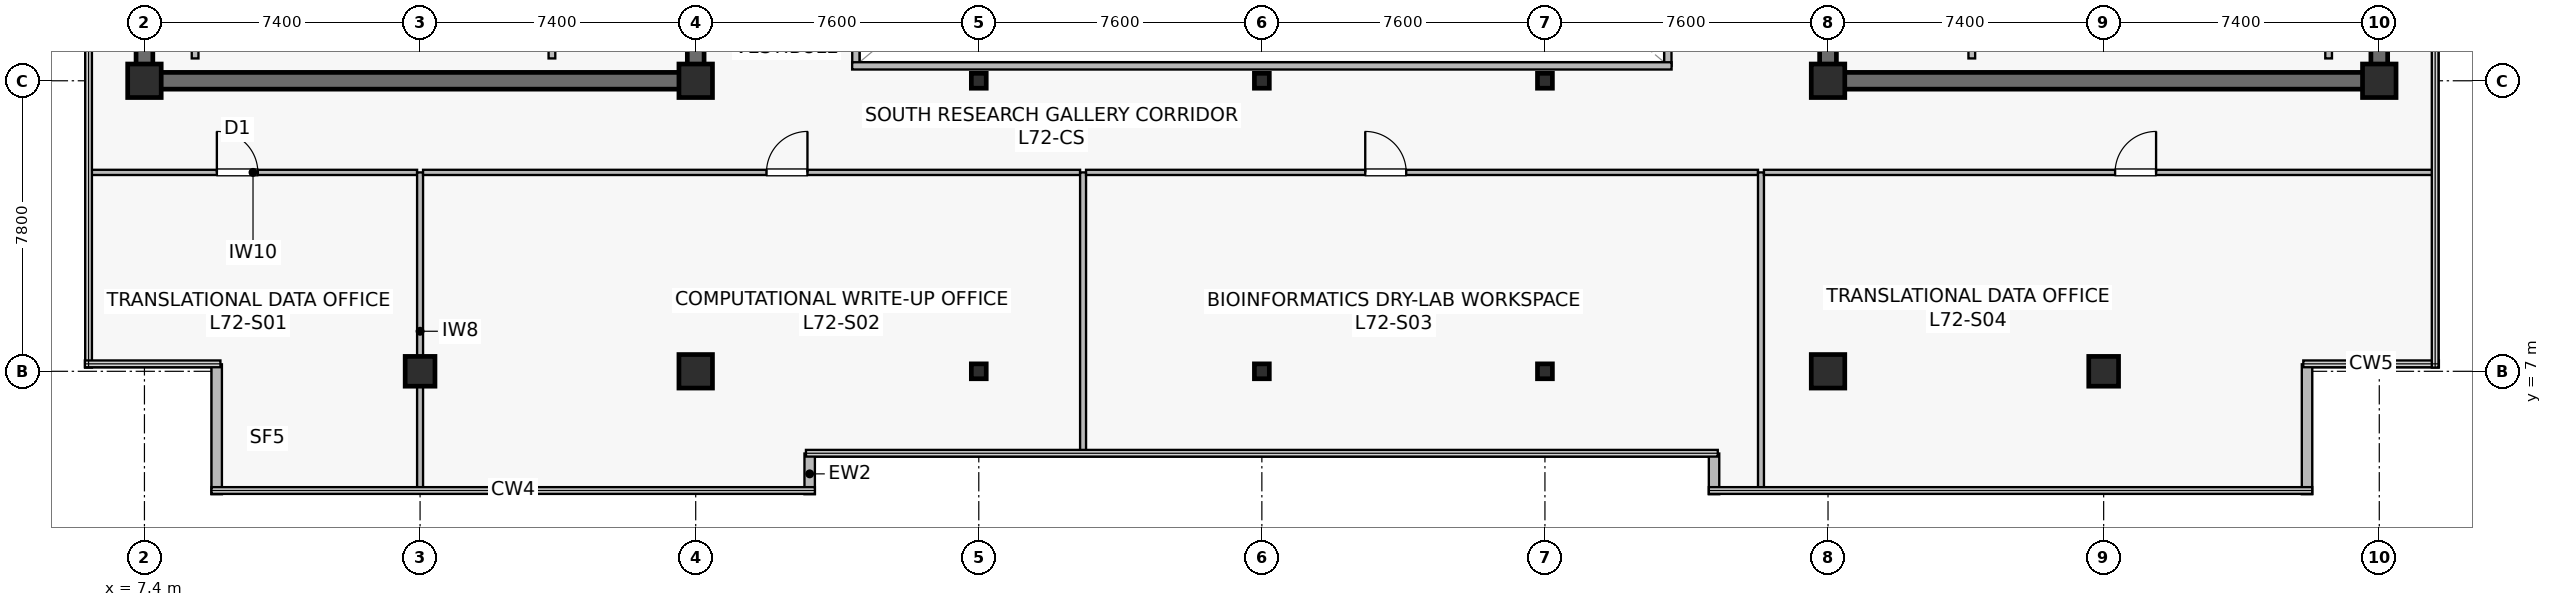
"""IFC4 building model, lengths in metres.
Left out: names, types, materials, properties, quantities, classifications, styles, units other than length and angle.
Written with IfcOpenShell. Run it as: python <this file> out.ifc"""

import sys

from ifc_helpers import new_model, si_unit, direction, frame, frame_2d, origin, origin_2d, place, context, subcontext, project, spatial, rectangle, i_section, extrude, source, transform, mapped, element, fill, save


model = new_model("IFC4")
c1 = context("Model", 3, precision=1e-05, world=origin(), true_north=direction((0.0, 1.0)))
c2 = subcontext(c1, "Body", "Model", "MODEL_VIEW")
j1 = project(units=[si_unit("LENGTHUNIT", "METRE"), si_unit("PLANEANGLEUNIT", "RADIAN")], contexts=[c1])
p1 = place(None, origin())
s1 = spatial("IfcSite", under=j1, at=p1, CompositionType="ELEMENT")
p2 = place(p1, origin())
s2 = spatial("IfcBuilding", under=s1, at=p2, CompositionType="ELEMENT")
p3 = place(p2, frame((0.0, 0.0, 301.8)))
s3 = spatial("IfcBuildingStorey", under=s2, at=p3, CompositionType="ELEMENT", Elevation=301.8)
p4 = place(p3, frame((7.175, 14.8, 0.0), z_axis=(0.0, 0.0, 1.0), x_axis=(1.0, 0.0, 0.0)))
e1 = element("IfcWall", 1, at=p4, inside=s3, PredefinedType="SHEAR", context=c2, shape_type="SweptSolid", body=[
    extrude(rectangle(XDim=15.25, YDim=0.45, at=frame_2d((7.625, 0.0))), origin(), (0.0, 0.0, 1.0), 3.9),
])
p5 = place(p3, frame((7.4, 15.025, 0.0), z_axis=(0.0, 0.0, 1.0), x_axis=(0.0, 1.0, 0.0)))
e2 = element("IfcWall", 2, at=p5, inside=s3, PredefinedType="SHEAR", context=c2, shape_type="SweptSolid", body=[
    extrude(rectangle(XDim=18.55, YDim=0.45, at=frame_2d((9.275, 0.0))), origin(), (0.0, 0.0, 1.0), 3.9),
])
p6 = place(p3, frame((22.2, 15.025, 0.0), z_axis=(0.0, 0.0, 1.0), x_axis=(0.0, 1.0, 0.0)))
e3 = element("IfcWall", 3, at=p6, inside=s3, PredefinedType="SHEAR", context=c2, shape_type="SweptSolid", body=[
    extrude(rectangle(XDim=18.55, YDim=0.45, at=frame_2d((9.275, 0.0))), origin(), (0.0, 0.0, 1.0), 3.9),
])
p7 = place(p6, frame((3.525, 0.0, 0.0)))
e4 = element("IfcOpeningElement", 4, at=p7, cuts=e3, PredefinedType="OPENING", context=c2, shape_type="SweptSolid", body=[
    extrude(rectangle(XDim=1.42, YDim=2.2, at=frame_2d((0.71, 1.1))), frame((0.0, 0.235, 0.0), z_axis=(0.0, -1.0, 0.0), x_axis=(1.0, 0.0, 0.0)), (0.0, 0.0, 1.0), 0.47),
])
p8 = place(p3, frame((52.375, 14.8, 0.0), z_axis=(0.0, 0.0, 1.0), x_axis=(1.0, 0.0, 0.0)))
e5 = element("IfcWall", 5, at=p8, inside=s3, PredefinedType="SHEAR", context=c2, shape_type="SweptSolid", body=[
    extrude(rectangle(XDim=15.25, YDim=0.45, at=frame_2d((7.625, 0.0))), origin(), (0.0, 0.0, 1.0), 3.9),
])
p9 = place(p3, frame((52.6, 15.025, 0.0), z_axis=(0.0, 0.0, 1.0), x_axis=(0.0, 1.0, 0.0)))
e6 = element("IfcWall", 6, at=p9, inside=s3, PredefinedType="SHEAR", context=c2, shape_type="SweptSolid", body=[
    extrude(rectangle(XDim=18.55, YDim=0.45, at=frame_2d((9.275, 0.0))), origin(), (0.0, 0.0, 1.0), 3.9),
])
p10 = place(p9, frame((3.525, 0.0, 0.0)))
e7 = element("IfcOpeningElement", 7, at=p10, cuts=e6, PredefinedType="OPENING", context=c2, shape_type="SweptSolid", body=[
    extrude(rectangle(XDim=1.42, YDim=2.2, at=frame_2d((0.71, 1.1))), frame((0.0, 0.235, 0.0), z_axis=(0.0, -1.0, 0.0), x_axis=(1.0, 0.0, 0.0)), (0.0, 0.0, 1.0), 0.47),
])
p11 = place(p3, frame((67.4, 15.025, 0.0), z_axis=(0.0, 0.0, 1.0), x_axis=(0.0, 1.0, 0.0)))
e8 = element("IfcWall", 8, at=p11, inside=s3, PredefinedType="SHEAR", context=c2, shape_type="SweptSolid", body=[
    extrude(rectangle(XDim=18.55, YDim=0.45, at=frame_2d((9.275, 0.0))), origin(), (0.0, 0.0, 1.0), 3.9),
])
m1 = source(origin(), c2, "Body", "SweptSolid", [
    extrude(rectangle(XDim=0.8, YDim=0.8, at=origin_2d()), origin(), (0.0, 0.0, 1.0), 4.2),
])
p12 = place(p3, frame((14.8, 7.0, 0.0), z_axis=(0.0, 0.0, 1.0), x_axis=(1.0, 0.0, 0.0)))
e9 = element("IfcColumn", 9, at=p12, inside=s3, PredefinedType="COLUMN", context=c2, shape_type="MappedRepresentation", body=[
    mapped(m1, transform((0.0, 0.0, 0.0), scale=1.0)),
])
m2 = source(origin(), c2, "Body", "SweptSolid", [
    extrude(rectangle(XDim=0.9, YDim=0.9, at=origin_2d()), origin(), (0.0, 0.0, 1.0), 4.2),
])
for number, where, z_axis, x_axis in (
    (10, (22.2, 7.0, 0.0), (0.0, 0.0, 1.0), (1.0, 0.0, 0.0)),
    (11, (7.4, 14.8, 0.0), (0.0, 0.0, 1.0), (1.0, 0.0, 0.0)),
    (12, (22.2, 14.8, 0.0), (0.0, 0.0, 1.0), (1.0, 0.0, 0.0)),
    (13, (52.6, 7.0, 0.0), (0.0, 0.0, 1.0), (1.0, 0.0, 0.0)),
):
    element("IfcColumn", number, at=place(p3, frame(where, z_axis=z_axis, x_axis=x_axis)), inside=s3, PredefinedType="COLUMN", context=c2, shape_type="MappedRepresentation", body=[
        mapped(m2, transform((0.0, 0.0, 0.0), scale=1.0)),
    ])
p13 = place(p3, frame((60.0, 7.0, 0.0), z_axis=(0.0, 0.0, 1.0), x_axis=(1.0, 0.0, 0.0)))
e14 = element("IfcColumn", 14, at=p13, inside=s3, PredefinedType="COLUMN", context=c2, shape_type="MappedRepresentation", body=[
    mapped(m1, transform((0.0, 0.0, 0.0), scale=1.0)),
])
for number, where, z_axis, x_axis in (
    (15, (52.6, 14.8, 0.0), (0.0, 0.0, 1.0), (1.0, 0.0, 0.0)),
    (16, (67.4, 14.8, 0.0), (0.0, 0.0, 1.0), (1.0, 0.0, 0.0)),
):
    element("IfcColumn", number, at=place(p3, frame(where, z_axis=z_axis, x_axis=x_axis)), inside=s3, PredefinedType="COLUMN", context=c2, shape_type="MappedRepresentation", body=[
        mapped(m2, transform((0.0, 0.0, 0.0), scale=1.0)),
    ])
m3 = source(origin(), c2, "Body", "SweptSolid", [
    extrude(i_section(OverallWidth=0.4, OverallDepth=0.4, WebThickness=0.021, FlangeThickness=0.021, at=origin_2d()), origin(), (0.0, 0.0, 1.0), 4.2),
])
for number, where, z_axis, x_axis in (
    (17, (29.8, 7.0, 0.0), (0.0, 0.0, 1.0), (1.0, 0.0, 0.0)),
    (18, (29.8, 14.8, 0.0), (0.0, 0.0, 1.0), (1.0, 0.0, 0.0)),
    (19, (37.4, 7.0, 0.0), (0.0, 0.0, 1.0), (1.0, 0.0, 0.0)),
    (20, (37.4, 14.8, 0.0), (0.0, 0.0, 1.0), (1.0, 0.0, 0.0)),
    (21, (45.0, 7.0, 0.0), (0.0, 0.0, 1.0), (1.0, 0.0, 0.0)),
    (22, (45.0, 14.8, 0.0), (0.0, 0.0, 1.0), (1.0, 0.0, 0.0)),
):
    element("IfcColumn", number, at=place(p3, frame(where, z_axis=z_axis, x_axis=x_axis)), inside=s3, PredefinedType="COLUMN", context=c2, shape_type="MappedRepresentation", body=[
        mapped(m3, transform((0.0, 0.0, 0.0), scale=1.0)),
    ])
for number, where, z_axis, x_axis in (
    (23, (25.26, 3.7, 0.0), (0.0, 0.0, 1.0), (0.0, 1.0, 0.0)),
    (24, (49.54, 4.793, 0.0), (0.0, 0.0, 1.0), (0.0, -1.0, 0.0)),
):
    element("IfcWall", number, at=place(p3, frame(where, z_axis=z_axis, x_axis=x_axis)), inside=s3, PredefinedType="STANDARD", context=c2, shape_type="SweptSolid", body=[
        extrude(rectangle(XDim=1.093, YDim=0.28, at=frame_2d((0.546, 0.0))), origin(), (0.0, 0.0, 1.0), 3.9),
    ])
for number, where, z_axis, x_axis in (
    (25, (65.46, 3.7, 0.0), (0.0, 0.0, 1.0), (0.0, 1.0, 0.0)),
    (26, (9.34, 7.188, 0.0), (0.0, 0.0, 1.0), (0.0, -1.0, 0.0)),
):
    element("IfcWall", number, at=place(p3, frame(where, z_axis=z_axis, x_axis=x_axis)), inside=s3, PredefinedType="STANDARD", context=c2, shape_type="SweptSolid", body=[
        extrude(rectangle(XDim=3.488, YDim=0.28, at=frame_2d((1.744, 0.0))), origin(), (0.0, 0.0, 1.0), 3.9),
    ])
for number, where, z_axis, x_axis in (
    (27, (18.34, 15.4, 0.0), (0.0, 0.0, 1.0), (0.0, 1.0, 0.0)),
    (28, (8.76, 15.4, 0.0), (0.0, 0.0, 1.0), (0.0, 1.0, 0.0)),
    (29, (56.46, 15.4, 0.0), (0.0, 0.0, 1.0), (0.0, 1.0, 0.0)),
    (30, (66.04, 15.4, 0.0), (0.0, 0.0, 1.0), (0.0, 1.0, 0.0)),
):
    element("IfcWall", number, at=place(p3, frame(where, z_axis=z_axis, x_axis=x_axis)), inside=s3, PredefinedType="SOLIDWALL", context=c2, shape_type="SweptSolid", body=[
        extrude(rectangle(XDim=2.4, YDim=0.18, at=frame_2d((1.2, 0.0))), origin(), (0.0, 0.0, 1.0), 3.9),
    ])
p14 = place(p3, frame((26.5, 15.2, 0.0), z_axis=(0.0, 0.0, 1.0), x_axis=(0.0, 1.0, 0.0)))
e31 = element("IfcWall", 31, at=p14, inside=s3, PredefinedType="SOLIDWALL", context=c2, shape_type="SweptSolid", body=[
    extrude(rectangle(XDim=18.2, YDim=0.195, at=frame_2d((9.1, 0.0))), origin(), (0.0, 0.0, 1.0), 3.9),
])
p15 = place(p14, frame((1.8, 0.0, 0.9)))
e32 = element("IfcOpeningElement", 32, at=p15, cuts=e31, PredefinedType="OPENING", context=c2, shape_type="SweptSolid", body=[
    extrude(rectangle(XDim=1.5, YDim=1.4, at=frame_2d((0.75, 0.7))), frame((0.0, 0.107, 0.0), z_axis=(0.0, -1.0, 0.0), x_axis=(1.0, 0.0, 0.0)), (0.0, 0.0, 1.0), 0.215),
])
p16 = place(p14, frame((13.2, 0.0, 0.9)))
e33 = element("IfcOpeningElement", 33, at=p16, cuts=e31, PredefinedType="OPENING", context=c2, shape_type="SweptSolid", body=[
    extrude(rectangle(XDim=1.5, YDim=1.4, at=frame_2d((0.75, 0.7))), frame((0.0, 0.107, 0.0), z_axis=(0.0, -1.0, 0.0), x_axis=(1.0, 0.0, 0.0)), (0.0, 0.0, 1.0), 0.215),
])
p17 = place(p3, frame((48.3, 15.2, 0.0), z_axis=(0.0, 0.0, 1.0), x_axis=(0.0, 1.0, 0.0)))
e34 = element("IfcWall", 34, at=p17, inside=s3, PredefinedType="SOLIDWALL", context=c2, shape_type="SweptSolid", body=[
    extrude(rectangle(XDim=18.2, YDim=0.195, at=frame_2d((9.1, 0.0))), origin(), (0.0, 0.0, 1.0), 3.9),
])
p18 = place(p17, frame((1.8, 0.0, 0.9)))
e35 = element("IfcOpeningElement", 35, at=p18, cuts=e34, PredefinedType="OPENING", context=c2, shape_type="SweptSolid", body=[
    extrude(rectangle(XDim=1.5, YDim=1.4, at=frame_2d((0.75, 0.7))), frame((0.0, 0.107, 0.0), z_axis=(0.0, -1.0, 0.0), x_axis=(1.0, 0.0, 0.0)), (0.0, 0.0, 1.0), 0.215),
])
p19 = place(p17, frame((13.2, 0.0, 0.9)))
e36 = element("IfcOpeningElement", 36, at=p19, cuts=e34, PredefinedType="OPENING", context=c2, shape_type="SweptSolid", body=[
    extrude(rectangle(XDim=1.5, YDim=1.4, at=frame_2d((0.75, 0.7))), frame((0.0, 0.107, 0.0), z_axis=(0.0, -1.0, 0.0), x_axis=(1.0, 0.0, 0.0)), (0.0, 0.0, 1.0), 0.215),
])
p20 = place(p3, frame((26.4, 15.2, 0.0), z_axis=(0.0, 0.0, 1.0), x_axis=(1.0, 0.0, 0.0)))
e37 = element("IfcWall", 37, at=p20, inside=s3, PredefinedType="SOLIDWALL", context=c2, shape_type="SweptSolid", body=[
    extrude(rectangle(XDim=22.0, YDim=0.195, at=frame_2d((11.0, 0.0))), origin(), (0.0, 0.0, 1.0), 3.9),
])
p21 = place(p3, frame((5.91, 12.34, 0.0), z_axis=(0.0, 0.0, 1.0), x_axis=(1.0, 0.0, 0.0)))
e38 = element("IfcWall", 38, at=p21, inside=s3, PredefinedType="PARTITIONING", context=c2, shape_type="SweptSolid", body=[
    extrude(rectangle(XDim=8.81, YDim=0.14, at=frame_2d((4.405, 0.0))), origin(), (0.0, 0.0, 1.0), 3.297),
])
p22 = place(p21, frame((3.434, 0.0, 0.0)))
e39 = element("IfcOpeningElement", 39, at=p22, cuts=e38, PredefinedType="OPENING", context=c2, shape_type="SweptSolid", body=[
    extrude(rectangle(XDim=1.1, YDim=2.18, at=frame_2d((0.55, 1.09))), frame((0.0, 0.08, 0.0), z_axis=(0.0, -1.0, 0.0), x_axis=(1.0, 0.0, 0.0)), (0.0, 0.0, 1.0), 0.16),
])
p23 = place(p3, frame((14.8, 3.81, 0.0), z_axis=(0.0, 0.0, 1.0), x_axis=(0.0, 1.0, 0.0)))
e40 = element("IfcWall", 40, at=p23, inside=s3, PredefinedType="PARTITIONING", context=c2, shape_type="SweptSolid", body=[
    extrude(rectangle(XDim=8.53, YDim=0.16, at=frame_2d((4.265, 0.0))), origin(), (0.0, 0.0, 1.0), 3.235),
])
p24 = place(p3, frame((14.88, 12.34, 0.0), z_axis=(0.0, 0.0, 1.0), x_axis=(1.0, 0.0, 0.0)))
e41 = element("IfcWall", 41, at=p24, inside=s3, PredefinedType="PARTITIONING", context=c2, shape_type="SweptSolid", body=[
    extrude(rectangle(XDim=17.64, YDim=0.14, at=frame_2d((8.82, 0.0))), origin(), (0.0, 0.0, 1.0), 3.297),
])
p25 = place(p24, frame((9.22, 0.0, 0.0)))
e42 = element("IfcOpeningElement", 42, at=p25, cuts=e41, PredefinedType="OPENING", context=c2, shape_type="SweptSolid", body=[
    extrude(rectangle(XDim=1.1, YDim=2.18, at=frame_2d((0.55, 1.09))), frame((0.0, 0.08, 0.0), z_axis=(0.0, -1.0, 0.0), x_axis=(1.0, 0.0, 0.0)), (0.0, 0.0, 1.0), 0.16),
])
p26 = place(p3, frame((32.6, 4.81, 0.0), z_axis=(0.0, 0.0, 1.0), x_axis=(0.0, 1.0, 0.0)))
e43 = element("IfcWall", 43, at=p26, inside=s3, PredefinedType="PARTITIONING", context=c2, shape_type="SweptSolid", body=[
    extrude(rectangle(XDim=7.53, YDim=0.16, at=frame_2d((3.765, 0.0))), origin(), (0.0, 0.0, 1.0), 2.985),
])
p27 = place(p3, frame((32.68, 12.34, 0.0), z_axis=(0.0, 0.0, 1.0), x_axis=(1.0, 0.0, 0.0)))
e44 = element("IfcWall", 44, at=p27, inside=s3, PredefinedType="PARTITIONING", context=c2, shape_type="SweptSolid", body=[
    extrude(rectangle(XDim=18.04, YDim=0.14, at=frame_2d((9.02, 0.0))), origin(), (0.0, 0.0, 1.0), 3.297),
])
p28 = place(p27, frame((7.496, 0.0, 0.0)))
e45 = element("IfcOpeningElement", 45, at=p28, cuts=e44, PredefinedType="OPENING", context=c2, shape_type="SweptSolid", body=[
    extrude(rectangle(XDim=1.1, YDim=2.18, at=frame_2d((0.55, 1.09))), frame((0.0, 0.08, 0.0), z_axis=(0.0, -1.0, 0.0), x_axis=(1.0, 0.0, 0.0)), (0.0, 0.0, 1.0), 0.16),
])
p29 = place(p3, frame((50.8, 3.81, 0.0), z_axis=(0.0, 0.0, 1.0), x_axis=(0.0, 1.0, 0.0)))
e46 = element("IfcWall", 46, at=p29, inside=s3, PredefinedType="PARTITIONING", context=c2, shape_type="SweptSolid", body=[
    extrude(rectangle(XDim=8.53, YDim=0.16, at=frame_2d((4.265, 0.0))), origin(), (0.0, 0.0, 1.0), 2.985),
])
p30 = place(p3, frame((50.88, 12.34, 0.0), z_axis=(0.0, 0.0, 1.0), x_axis=(1.0, 0.0, 0.0)))
e47 = element("IfcWall", 47, at=p30, inside=s3, PredefinedType="PARTITIONING", context=c2, shape_type="SweptSolid", body=[
    extrude(rectangle(XDim=18.01, YDim=0.14, at=frame_2d((9.005, 0.0))), origin(), (0.0, 0.0, 1.0), 3.297),
])
p31 = place(p30, frame((9.427, 0.0, 0.0)))
e48 = element("IfcOpeningElement", 48, at=p31, cuts=e47, PredefinedType="OPENING", context=c2, shape_type="SweptSolid", body=[
    extrude(rectangle(XDim=1.1, YDim=2.18, at=frame_2d((0.55, 1.09))), frame((0.0, 0.08, 0.0), z_axis=(0.0, -1.0, 0.0), x_axis=(1.0, 0.0, 0.0)), (0.0, 0.0, 1.0), 0.16),
])
m4 = source(origin(), c2, "Body", "SweptSolid", [
    extrude(rectangle(XDim=1.1, YDim=2.18, at=frame_2d((0.55, 1.09))), frame((0.0, 0.025, 0.0), z_axis=(0.0, -1.0, 0.0), x_axis=(1.0, 0.0, 0.0)), (0.0, 0.0, 1.0), 0.05),
])
p32 = place(p22, origin())
e49 = element("IfcDoor", 49, at=p32, inside=s3, OperationType="SINGLE_SWING_LEFT", PredefinedType="DOOR", context=c2, shape_type="MappedRepresentation", body=[
    mapped(m4, transform((0.0, 0.0, 0.0), scale=1.0)),
])
fill(e39, e49)
p33 = place(p25, origin())
e50 = element("IfcDoor", 50, at=p33, inside=s3, OperationType="SINGLE_SWING_RIGHT", PredefinedType="DOOR", context=c2, shape_type="MappedRepresentation", body=[
    mapped(m4, transform((0.0, 0.0, 0.0), scale=1.0)),
])
fill(e42, e50)
p34 = place(p28, origin())
e51 = element("IfcDoor", 51, at=p34, inside=s3, OperationType="SINGLE_SWING_LEFT", PredefinedType="DOOR", context=c2, shape_type="MappedRepresentation", body=[
    mapped(m4, transform((0.0, 0.0, 0.0), scale=1.0)),
])
fill(e45, e51)
p35 = place(p31, origin())
e52 = element("IfcDoor", 52, at=p35, inside=s3, OperationType="SINGLE_SWING_RIGHT", PredefinedType="DOOR", context=c2, shape_type="MappedRepresentation", body=[
    mapped(m4, transform((0.0, 0.0, 0.0), scale=1.0)),
])
fill(e48, e52)
save(model, sys.argv[1])
